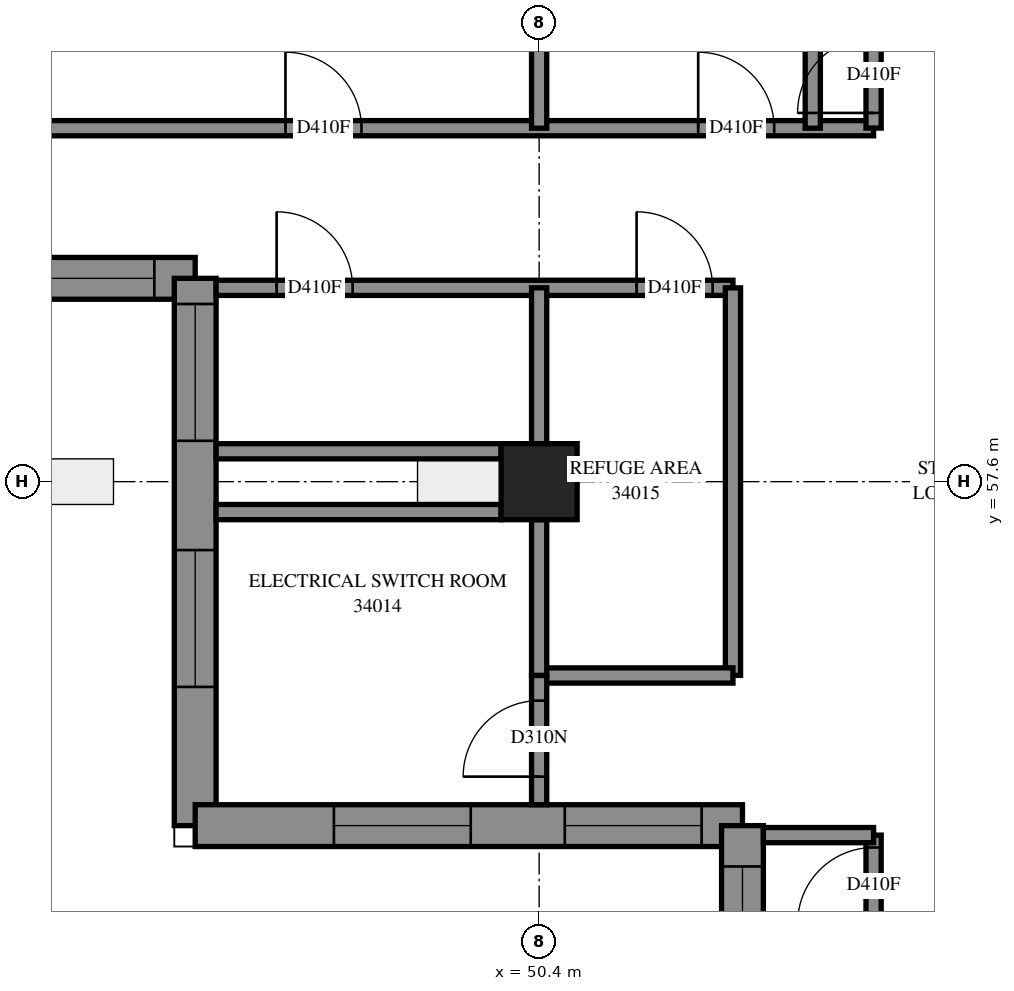
"""IFC4 building model, lengths in metres.
Left out: names, types, materials, properties, quantities, classifications, styles, units other than length and angle.
Written with IfcOpenShell. Run it as: python <this file> out.ifc"""

import sys

from ifc_helpers import new_model, si_unit, direction, frame, frame_2d, origin, origin_2d, place, context, subcontext, project, spatial, polyline, rectangle, outline, extrude, element, fill, save


model = new_model("IFC4")
c1 = context("Model", 3, precision=1e-05, world=origin(), true_north=direction((0.0, 1.0)))
c2 = subcontext(c1, "Body", "Model", "MODEL_VIEW")
j1 = project(units=[si_unit("LENGTHUNIT", "METRE"), si_unit("PLANEANGLEUNIT", "RADIAN")], contexts=[c1])
p1 = place(None, origin())
s1 = spatial("IfcSite", under=j1, at=p1, CompositionType="ELEMENT")
p2 = place(p1, origin())
s2 = spatial("IfcBuilding", under=s1, at=p2, CompositionType="ELEMENT")
p3 = place(p2, frame((0.0, 0.0, 126.2)))
s3 = spatial("IfcBuildingStorey", under=s2, at=p3, CompositionType="ELEMENT", Elevation=126.2)
p4 = place(p3, frame((50.4, 57.6, 0.0), z_axis=(0.0, 0.0, 1.0), x_axis=(1.0, 0.0, 0.0)))
e1 = element("IfcColumn", 1, at=p4, inside=s3, PredefinedType="COLUMN", context=c2, shape_type="SweptSolid", body=[
    extrude(rectangle(XDim=1.0, YDim=1.0, at=origin_2d()), origin(), (0.0, 0.0, 1.0), 4.7),
])
p5 = place(p3, frame((38.675, 60.275, 0.0), z_axis=(0.0, 0.0, 1.0), x_axis=(1.0, 0.0, 0.0)))
e2 = element("IfcWall", 2, at=p5, inside=s3, PredefinedType="SOLIDWALL", context=c2, shape_type="SweptSolid", body=[
    extrude(outline(polyline([(-0.275, -0.275), (6.925, -0.275), (7.475, 0.275), (0.275, 0.275), (-0.275, -0.275)])), origin(), (0.0, 0.0, 1.0), 4.7),
])
p6 = place(p5, frame((1.825, 0.0, 0.9)))
e3 = element("IfcOpeningElement", 3, at=p6, cuts=e2, PredefinedType="OPENING", context=c2, shape_type="SweptSolid", body=[
    extrude(rectangle(XDim=1.8, YDim=2.4, at=frame_2d((0.9, 1.2))), frame((0.0, 0.285, 0.0), z_axis=(0.0, -1.0, 0.0), x_axis=(1.0, 0.0, 0.0)), (0.0, 0.0, 1.0), 0.57),
])
p7 = place(p5, frame((4.862, 0.0, 0.9)))
e4 = element("IfcOpeningElement", 4, at=p7, cuts=e2, PredefinedType="OPENING", context=c2, shape_type="SweptSolid", body=[
    extrude(rectangle(XDim=1.8, YDim=2.4, at=frame_2d((0.9, 1.2))), frame((0.0, 0.285, 0.0), z_axis=(0.0, -1.0, 0.0), x_axis=(1.0, 0.0, 0.0)), (0.0, 0.0, 1.0), 0.57),
])
p8 = place(p3, frame((45.875, 60.275, 0.0), z_axis=(0.0, 0.0, 1.0), x_axis=(0.0, -1.0, 0.0)))
e5 = element("IfcWall", 5, at=p8, inside=s3, PredefinedType="SOLIDWALL", context=c2, shape_type="SweptSolid", body=[
    extrude(outline(polyline([(0.275, -0.275), (7.475, -0.275), (6.925, 0.275), (-0.275, 0.275), (0.275, -0.275)])), origin(), (0.0, 0.0, 1.0), 4.7),
])
p9 = place(p8, frame((0.338, 0.0, 0.9)))
e6 = element("IfcOpeningElement", 6, at=p9, cuts=e5, PredefinedType="OPENING", context=c2, shape_type="SweptSolid", body=[
    extrude(rectangle(XDim=1.8, YDim=2.4, at=frame_2d((0.9, 1.2))), frame((0.0, 0.285, 0.0), z_axis=(0.0, -1.0, 0.0), x_axis=(1.0, 0.0, 0.0)), (0.0, 0.0, 1.0), 0.57),
])
p10 = place(p8, frame((3.575, 0.0, 0.9)))
e7 = element("IfcOpeningElement", 7, at=p10, cuts=e5, PredefinedType="OPENING", context=c2, shape_type="SweptSolid", body=[
    extrude(rectangle(XDim=1.8, YDim=2.4, at=frame_2d((0.9, 1.2))), frame((0.0, 0.285, 0.0), z_axis=(0.0, -1.0, 0.0), x_axis=(1.0, 0.0, 0.0)), (0.0, 0.0, 1.0), 0.57),
])
p11 = place(p3, frame((45.875, 53.075, 0.0), z_axis=(0.0, 0.0, 1.0), x_axis=(1.0, 0.0, 0.0)))
e8 = element("IfcWall", 8, at=p11, inside=s3, PredefinedType="SOLIDWALL", context=c2, shape_type="SweptSolid", body=[
    extrude(outline(polyline([(-0.275, -0.275), (6.925, -0.275), (7.475, 0.275), (0.275, 0.275), (-0.275, -0.275)])), origin(), (0.0, 0.0, 1.0), 4.7),
])
p12 = place(p11, frame((1.825, 0.0, 0.9)))
e9 = element("IfcOpeningElement", 9, at=p12, cuts=e8, PredefinedType="OPENING", context=c2, shape_type="SweptSolid", body=[
    extrude(rectangle(XDim=1.8, YDim=2.4, at=frame_2d((0.9, 1.2))), frame((0.0, 0.285, 0.0), z_axis=(0.0, -1.0, 0.0), x_axis=(1.0, 0.0, 0.0)), (0.0, 0.0, 1.0), 0.57),
])
p13 = place(p11, frame((4.862, 0.0, 0.9)))
e10 = element("IfcOpeningElement", 10, at=p13, cuts=e8, PredefinedType="OPENING", context=c2, shape_type="SweptSolid", body=[
    extrude(rectangle(XDim=1.8, YDim=2.4, at=frame_2d((0.9, 1.2))), frame((0.0, 0.285, 0.0), z_axis=(0.0, -1.0, 0.0), x_axis=(1.0, 0.0, 0.0)), (0.0, 0.0, 1.0), 0.57),
])
p14 = place(p3, frame((53.075, 53.075, 0.0), z_axis=(0.0, 0.0, 1.0), x_axis=(0.0, -1.0, 0.0)))
e11 = element("IfcWall", 11, at=p14, inside=s3, PredefinedType="SOLIDWALL", context=c2, shape_type="SweptSolid", body=[
    extrude(outline(polyline([(0.275, -0.275), (7.475, -0.275), (6.925, 0.275), (-0.275, 0.275), (0.275, -0.275)])), origin(), (0.0, 0.0, 1.0), 4.7),
])
p15 = place(p14, frame((0.537, 0.0, 0.9)))
e12 = element("IfcOpeningElement", 12, at=p15, cuts=e11, PredefinedType="OPENING", context=c2, shape_type="SweptSolid", body=[
    extrude(rectangle(XDim=1.8, YDim=2.4, at=frame_2d((0.9, 1.2))), frame((0.0, 0.285, 0.0), z_axis=(0.0, -1.0, 0.0), x_axis=(1.0, 0.0, 0.0)), (0.0, 0.0, 1.0), 0.57),
])
p16 = place(p14, frame((3.575, 0.0, 0.9)))
e13 = element("IfcOpeningElement", 13, at=p16, cuts=e11, PredefinedType="OPENING", context=c2, shape_type="SweptSolid", body=[
    extrude(rectangle(XDim=1.8, YDim=2.4, at=frame_2d((0.9, 1.2))), frame((0.0, 0.285, 0.0), z_axis=(0.0, -1.0, 0.0), x_axis=(1.0, 0.0, 0.0)), (0.0, 0.0, 1.0), 0.57),
])
p17 = place(p3, frame((40.652, 62.25, 0.0), z_axis=(0.0, 0.0, 1.0), x_axis=(1.0, 0.0, 0.0)))
e14 = element("IfcWall", 14, at=p17, inside=s3, PredefinedType="PARTITIONING", context=c2, shape_type="SweptSolid", body=[
    extrude(rectangle(XDim=14.148, YDim=0.2, at=frame_2d((7.074, 0.0))), origin(), (0.0, 0.0, 1.0), 4.7),
])
p18 = place(p17, frame((6.41, 0.0, 0.0)))
e15 = element("IfcOpeningElement", 15, at=p18, cuts=e14, PredefinedType="OPENING", context=c2, shape_type="SweptSolid", body=[
    extrude(rectangle(XDim=1.0, YDim=2.1, at=frame_2d((0.5, 1.05))), frame((0.0, 0.11, 0.0), z_axis=(0.0, -1.0, 0.0), x_axis=(1.0, 0.0, 0.0)), (0.0, 0.0, 1.0), 0.22),
])
p19 = place(p17, frame((11.841, 0.0, 0.0)))
e16 = element("IfcOpeningElement", 16, at=p19, cuts=e14, PredefinedType="OPENING", context=c2, shape_type="SweptSolid", body=[
    extrude(rectangle(XDim=1.0, YDim=2.1, at=frame_2d((0.5, 1.05))), frame((0.0, 0.11, 0.0), z_axis=(0.0, -1.0, 0.0), x_axis=(1.0, 0.0, 0.0)), (0.0, 0.0, 1.0), 0.22),
])
p20 = place(p3, frame((46.15, 60.15, 0.0), z_axis=(0.0, 0.0, 1.0), x_axis=(1.0, 0.0, 0.0)))
e17 = element("IfcWall", 17, at=p20, inside=s3, PredefinedType="PARTITIONING", context=c2, shape_type="SweptSolid", body=[
    extrude(rectangle(XDim=6.8, YDim=0.2, at=frame_2d((3.4, 0.0))), origin(), (0.0, 0.0, 1.0), 4.7),
])
p21 = place(p20, frame((0.796, 0.0, 0.0)))
e18 = element("IfcOpeningElement", 18, at=p21, cuts=e17, PredefinedType="OPENING", context=c2, shape_type="SweptSolid", body=[
    extrude(rectangle(XDim=1.0, YDim=2.1, at=frame_2d((0.5, 1.05))), frame((0.0, 0.11, 0.0), z_axis=(0.0, -1.0, 0.0), x_axis=(1.0, 0.0, 0.0)), (0.0, 0.0, 1.0), 0.22),
])
p22 = place(p20, frame((5.532, 0.0, 0.0)))
e19 = element("IfcOpeningElement", 19, at=p22, cuts=e17, PredefinedType="OPENING", context=c2, shape_type="SweptSolid", body=[
    extrude(rectangle(XDim=1.0, YDim=2.1, at=frame_2d((0.5, 1.05))), frame((0.0, 0.11, 0.0), z_axis=(0.0, -1.0, 0.0), x_axis=(1.0, 0.0, 0.0)), (0.0, 0.0, 1.0), 0.22),
])
p23 = place(p3, frame((54.0, 62.25, 0.0), z_axis=(0.0, 0.0, 1.0), x_axis=(0.0, 1.0, 0.0)))
e20 = element("IfcWall", 20, at=p23, inside=s3, PredefinedType="PARTITIONING", context=c2, shape_type="SweptSolid", body=[
    extrude(rectangle(XDim=6.8, YDim=0.2, at=frame_2d((3.4, 0.0))), origin(), (0.0, 0.0, 1.0), 4.7),
])
p24 = place(p3, frame((54.8, 47.6, 0.0), z_axis=(0.0, 0.0, 1.0), x_axis=(0.0, 1.0, 0.0)))
e21 = element("IfcWall", 21, at=p24, inside=s3, PredefinedType="PARTITIONING", context=c2, shape_type="SweptSolid", body=[
    extrude(rectangle(XDim=5.35, YDim=0.2, at=frame_2d((2.675, 0.0))), origin(), (0.0, 0.0, 1.0), 4.7),
])
p25 = place(p24, frame((4.187, 0.0, 0.0)))
e22 = element("IfcOpeningElement", 22, at=p25, cuts=e21, PredefinedType="OPENING", context=c2, shape_type="SweptSolid", body=[
    extrude(rectangle(XDim=1.0, YDim=2.1, at=frame_2d((0.5, 1.05))), frame((0.0, 0.11, 0.0), z_axis=(0.0, -1.0, 0.0), x_axis=(1.0, 0.0, 0.0)), (0.0, 0.0, 1.0), 0.22),
])
p26 = place(p3, frame((54.8, 62.252, 0.0), z_axis=(0.0, 0.0, 1.0), x_axis=(0.0, 1.0, 0.0)))
e23 = element("IfcWall", 23, at=p26, inside=s3, PredefinedType="PARTITIONING", context=c2, shape_type="SweptSolid", body=[
    extrude(rectangle(XDim=5.346, YDim=0.2, at=frame_2d((2.673, 0.0))), origin(), (0.0, 0.0, 1.0), 4.7),
])
p27 = place(p26, frame((0.199, 0.0, 0.0)))
e24 = element("IfcOpeningElement", 24, at=p27, cuts=e23, PredefinedType="OPENING", context=c2, shape_type="SweptSolid", body=[
    extrude(rectangle(XDim=1.0, YDim=2.1, at=frame_2d((0.5, 1.05))), frame((0.0, 0.11, 0.0), z_axis=(0.0, -1.0, 0.0), x_axis=(1.0, 0.0, 0.0)), (0.0, 0.0, 1.0), 0.22),
])
p28 = place(p3, frame((52.95, 55.052, 0.0), z_axis=(0.0, 0.0, 1.0), x_axis=(0.0, 1.0, 0.0)))
e25 = element("IfcWall", 25, at=p28, inside=s3, PredefinedType="PARTITIONING", context=c2, shape_type="SweptSolid", body=[
    extrude(rectangle(XDim=5.098, YDim=0.2, at=frame_2d((2.549, 0.0))), origin(), (0.0, 0.0, 1.0), 4.7),
])
for number, where, z_axis, x_axis in (
    (26, (46.15, 57.2, 0.0), (0.0, 0.0, 1.0), (1.0, 0.0, 0.0)),
    (27, (46.15, 58.0, 0.0), (0.0, 0.0, 1.0), (1.0, 0.0, 0.0)),
):
    element("IfcWall", number, at=place(p3, frame(where, z_axis=z_axis, x_axis=x_axis)), inside=s3, PredefinedType="PARTITIONING", context=c2, shape_type="SweptSolid", body=[
        extrude(rectangle(XDim=3.75, YDim=0.2, at=frame_2d((1.875, 0.0))), origin(), (0.0, 0.0, 1.0), 4.7),
    ])
p29 = place(p3, frame((50.4, 55.05, 0.0), z_axis=(0.0, 0.0, 1.0), x_axis=(1.0, 0.0, 0.0)))
e28 = element("IfcWall", 28, at=p29, inside=s3, PredefinedType="PARTITIONING", context=c2, shape_type="SweptSolid", body=[
    extrude(rectangle(XDim=2.55, YDim=0.2, at=frame_2d((1.275, 0.0))), origin(), (0.0, 0.0, 1.0), 4.7),
])
for number, where, z_axis, x_axis in (
    (29, (50.4, 55.05, 0.0), (0.0, 0.0, 1.0), (0.0, 1.0, 0.0)),
    (30, (50.4, 58.1, 0.0), (0.0, 0.0, 1.0), (0.0, 1.0, 0.0)),
    (31, (50.4, 62.25, 0.0), (0.0, 0.0, 1.0), (0.0, 1.0, 0.0)),
):
    element("IfcWall", number, at=place(p3, frame(where, z_axis=z_axis, x_axis=x_axis)), inside=s3, PredefinedType="PARTITIONING", context=c2, shape_type="SweptSolid", body=[
        extrude(rectangle(XDim=2.05, YDim=0.2, at=frame_2d((1.025, 0.0))), origin(), (0.0, 0.0, 1.0), 4.7),
    ])
p30 = place(p3, frame((50.4, 53.35, 0.0), z_axis=(0.0, 0.0, 1.0), x_axis=(0.0, 1.0, 0.0)))
e32 = element("IfcWall", 32, at=p30, inside=s3, PredefinedType="PARTITIONING", context=c2, shape_type="SweptSolid", body=[
    extrude(rectangle(XDim=1.7, YDim=0.2, at=frame_2d((0.85, 0.0))), origin(), (0.0, 0.0, 1.0), 4.7),
])
p31 = place(p30, frame((0.369, 0.0, 0.0)))
e33 = element("IfcOpeningElement", 33, at=p31, cuts=e32, PredefinedType="OPENING", context=c2, shape_type="SweptSolid", body=[
    extrude(rectangle(XDim=1.0, YDim=2.1, at=frame_2d((0.5, 1.05))), frame((0.0, 0.11, 0.0), z_axis=(0.0, -1.0, 0.0), x_axis=(1.0, 0.0, 0.0)), (0.0, 0.0, 1.0), 0.22),
])
p32 = place(p3, frame((53.35, 52.95, 0.0), z_axis=(0.0, 0.0, 1.0), x_axis=(1.0, 0.0, 0.0)))
e34 = element("IfcWall", 34, at=p32, inside=s3, PredefinedType="PARTITIONING", context=c2, shape_type="SweptSolid", body=[
    extrude(rectangle(XDim=1.45, YDim=0.2, at=frame_2d((0.725, 0.0))), origin(), (0.0, 0.0, 1.0), 4.7),
])
p33 = place(p7, origin())
e35 = element("IfcWindow", 35, at=p33, inside=s3, PartitioningType="SINGLE_PANEL", PredefinedType="WINDOW", context=c2, shape_type="SweptSolid", body=[
    extrude(rectangle(XDim=1.8, YDim=2.4, at=frame_2d((0.9, 1.2))), frame((0.0, 0.155, 0.0), z_axis=(0.0, -1.0, 0.0), x_axis=(1.0, 0.0, 0.0)), (0.0, 0.0, 1.0), 0.06),
])
fill(e4, e35)
p34 = place(p9, origin())
e36 = element("IfcWindow", 36, at=p34, inside=s3, PartitioningType="SINGLE_PANEL", PredefinedType="WINDOW", context=c2, shape_type="SweptSolid", body=[
    extrude(rectangle(XDim=1.8, YDim=2.4, at=frame_2d((0.9, 1.2))), frame((0.0, 0.155, 0.0), z_axis=(0.0, -1.0, 0.0), x_axis=(1.0, 0.0, 0.0)), (0.0, 0.0, 1.0), 0.06),
])
fill(e6, e36)
p35 = place(p10, origin())
e37 = element("IfcWindow", 37, at=p35, inside=s3, PartitioningType="SINGLE_PANEL", PredefinedType="WINDOW", context=c2, shape_type="SweptSolid", body=[
    extrude(rectangle(XDim=1.8, YDim=2.4, at=frame_2d((0.9, 1.2))), frame((0.0, 0.155, 0.0), z_axis=(0.0, -1.0, 0.0), x_axis=(1.0, 0.0, 0.0)), (0.0, 0.0, 1.0), 0.06),
])
fill(e7, e37)
p36 = place(p12, origin())
e38 = element("IfcWindow", 38, at=p36, inside=s3, PartitioningType="SINGLE_PANEL", PredefinedType="WINDOW", context=c2, shape_type="SweptSolid", body=[
    extrude(rectangle(XDim=1.8, YDim=2.4, at=frame_2d((0.9, 1.2))), frame((0.0, 0.155, 0.0), z_axis=(0.0, -1.0, 0.0), x_axis=(1.0, 0.0, 0.0)), (0.0, 0.0, 1.0), 0.06),
])
fill(e9, e38)
p37 = place(p13, origin())
e39 = element("IfcWindow", 39, at=p37, inside=s3, PartitioningType="SINGLE_PANEL", PredefinedType="WINDOW", context=c2, shape_type="SweptSolid", body=[
    extrude(rectangle(XDim=1.8, YDim=2.4, at=frame_2d((0.9, 1.2))), frame((0.0, 0.155, 0.0), z_axis=(0.0, -1.0, 0.0), x_axis=(1.0, 0.0, 0.0)), (0.0, 0.0, 1.0), 0.06),
])
fill(e10, e39)
p38 = place(p15, origin())
e40 = element("IfcWindow", 40, at=p38, inside=s3, PartitioningType="SINGLE_PANEL", PredefinedType="WINDOW", context=c2, shape_type="SweptSolid", body=[
    extrude(rectangle(XDim=1.8, YDim=2.4, at=frame_2d((0.9, 1.2))), frame((0.0, 0.155, 0.0), z_axis=(0.0, -1.0, 0.0), x_axis=(1.0, 0.0, 0.0)), (0.0, 0.0, 1.0), 0.06),
])
fill(e12, e40)
p39 = place(p25, origin())
e41 = element("IfcDoor", 41, at=p39, inside=s3, OperationType="SINGLE_SWING_RIGHT", PredefinedType="DOOR", context=c2, shape_type="SweptSolid", body=[
    extrude(rectangle(XDim=1.0, YDim=2.1, at=frame_2d((0.5, 1.05))), frame((0.0, 0.025, 0.0), z_axis=(0.0, -1.0, 0.0), x_axis=(1.0, 0.0, 0.0)), (0.0, 0.0, 1.0), 0.05),
])
fill(e22, e41)
p40 = place(p21, origin())
e42 = element("IfcDoor", 42, at=p40, inside=s3, OperationType="SINGLE_SWING_RIGHT", PredefinedType="DOOR", context=c2, shape_type="SweptSolid", body=[
    extrude(rectangle(XDim=1.0, YDim=2.1, at=frame_2d((0.5, 1.05))), frame((0.0, 0.025, 0.0), z_axis=(0.0, -1.0, 0.0), x_axis=(1.0, 0.0, 0.0)), (0.0, 0.0, 1.0), 0.05),
])
fill(e18, e42)
p41 = place(p22, origin())
e43 = element("IfcDoor", 43, at=p41, inside=s3, OperationType="SINGLE_SWING_LEFT", PredefinedType="DOOR", context=c2, shape_type="SweptSolid", body=[
    extrude(rectangle(XDim=1.0, YDim=2.1, at=frame_2d((0.5, 1.05))), frame((0.0, 0.025, 0.0), z_axis=(0.0, -1.0, 0.0), x_axis=(1.0, 0.0, 0.0)), (0.0, 0.0, 1.0), 0.05),
])
fill(e19, e43)
p42 = place(p18, origin())
e44 = element("IfcDoor", 44, at=p42, inside=s3, OperationType="SINGLE_SWING_RIGHT", PredefinedType="DOOR", context=c2, shape_type="SweptSolid", body=[
    extrude(rectangle(XDim=1.0, YDim=2.1, at=frame_2d((0.5, 1.05))), frame((0.0, 0.025, 0.0), z_axis=(0.0, -1.0, 0.0), x_axis=(1.0, 0.0, 0.0)), (0.0, 0.0, 1.0), 0.05),
])
fill(e15, e44)
p43 = place(p19, origin())
e45 = element("IfcDoor", 45, at=p43, inside=s3, OperationType="SINGLE_SWING_RIGHT", PredefinedType="DOOR", context=c2, shape_type="SweptSolid", body=[
    extrude(rectangle(XDim=1.0, YDim=2.1, at=frame_2d((0.5, 1.05))), frame((0.0, 0.025, 0.0), z_axis=(0.0, -1.0, 0.0), x_axis=(1.0, 0.0, 0.0)), (0.0, 0.0, 1.0), 0.05),
])
fill(e16, e45)
p44 = place(p27, origin())
e46 = element("IfcDoor", 46, at=p44, inside=s3, OperationType="SINGLE_SWING_LEFT", PredefinedType="DOOR", context=c2, shape_type="SweptSolid", body=[
    extrude(rectangle(XDim=1.0, YDim=2.1, at=frame_2d((0.5, 1.05))), frame((0.0, 0.025, 0.0), z_axis=(0.0, -1.0, 0.0), x_axis=(1.0, 0.0, 0.0)), (0.0, 0.0, 1.0), 0.05),
])
fill(e24, e46)
p45 = place(p31, origin())
e47 = element("IfcDoor", 47, at=p45, inside=s3, OperationType="SINGLE_SWING_LEFT", PredefinedType="DOOR", context=c2, shape_type="SweptSolid", body=[
    extrude(rectangle(XDim=1.0, YDim=2.1, at=frame_2d((0.5, 1.05))), frame((0.0, 0.025, 0.0), z_axis=(0.0, -1.0, 0.0), x_axis=(1.0, 0.0, 0.0)), (0.0, 0.0, 1.0), 0.05),
])
fill(e33, e47)
save(model, sys.argv[1])
